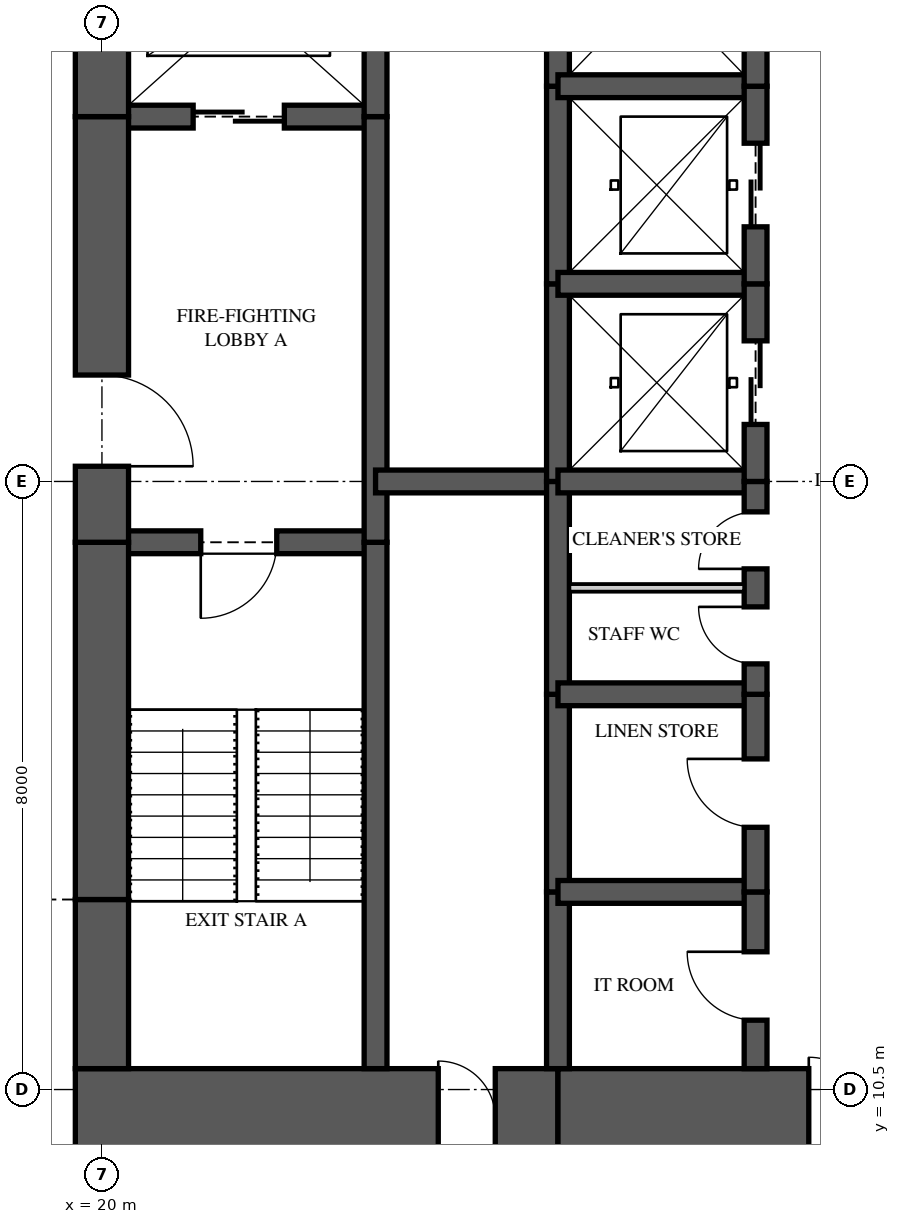
"""IFC4 building model, lengths in metres.
Left out: names, types, materials, properties, quantities, classifications, styles, units other than length and angle.
Written with IfcOpenShell. Run it as: python <this file> out.ifc"""

import sys

from ifc_helpers import new_model, si_unit, direction, frame, frame_2d, origin, place, context, subcontext, project, spatial, rectangle, extrude, element, fill, save


model = new_model("IFC4")
c1 = context("Model", 3, precision=1e-05, world=origin(), true_north=direction((0.0, 1.0)))
c2 = subcontext(c1, "Body", "Model", "MODEL_VIEW")
j1 = project(units=[si_unit("LENGTHUNIT", "METRE"), si_unit("PLANEANGLEUNIT", "RADIAN")], contexts=[c1])
p1 = place(None, origin())
s1 = spatial("IfcSite", under=j1, at=p1, CompositionType="ELEMENT")
p2 = place(p1, origin())
s2 = spatial("IfcBuilding", under=s1, at=p2, CompositionType="ELEMENT")
p3 = place(p2, frame((0.0, 0.0, 187.85)))
s3 = spatial("IfcBuildingStorey", under=s2, at=p3, CompositionType="ELEMENT", Elevation=187.85)
p4 = place(p3, frame((19.65, 10.125, 0.0), z_axis=(0.0, 0.0, 1.0), x_axis=(1.0, 0.0, 0.0)))
e1 = element("IfcWall", 1, at=p4, inside=s3, PredefinedType="SHEAR", context=c2, shape_type="SweptSolid", body=[
    extrude(rectangle(XDim=6.35, YDim=1.3, at=frame_2d((3.175, 0.0))), origin(), (0.0, 0.0, 1.0), 3.35),
])
p5 = place(p4, frame((4.775, 0.0, 0.0)))
e2 = element("IfcOpeningElement", 2, at=p5, cuts=e1, PredefinedType="OPENING", context=c2, shape_type="SweptSolid", body=[
    extrude(rectangle(XDim=0.75, YDim=2.1, at=frame_2d((0.375, 1.05))), frame((0.0, 0.66, 0.0), z_axis=(0.0, -1.0, 0.0), x_axis=(1.0, 0.0, 0.0)), (0.0, 0.0, 1.0), 1.32),
])
p6 = place(p3, frame((26.0, 10.125, 0.0), z_axis=(0.0, 0.0, 1.0), x_axis=(1.0, 0.0, 0.0)))
e3 = element("IfcWall", 3, at=p6, inside=s3, PredefinedType="SHEAR", context=c2, shape_type="SweptSolid", body=[
    extrude(rectangle(XDim=5.6, YDim=1.3, at=frame_2d((2.8, 0.0))), origin(), (0.0, 0.0, 1.0), 3.35),
])
p7 = place(p6, frame((3.3, 0.0, 0.0)))
e4 = element("IfcOpeningElement", 4, at=p7, cuts=e3, PredefinedType="OPENING", context=c2, shape_type="SweptSolid", body=[
    extrude(rectangle(XDim=1.6, YDim=2.1, at=frame_2d((0.8, 1.05))), frame((0.0, 0.66, 0.0), z_axis=(0.0, -1.0, 0.0), x_axis=(1.0, 0.0, 0.0)), (0.0, 0.0, 1.0), 1.32),
])
p8 = place(p3, frame((20.0, 26.225, 0.0), z_axis=(0.0, 0.0, 1.0), x_axis=(0.0, -1.0, 0.0)))
e5 = element("IfcWall", 5, at=p8, inside=s3, PredefinedType="SHEAR", context=c2, shape_type="SweptSolid", body=[
    extrude(rectangle(XDim=2.925, YDim=0.7, at=frame_2d((1.462, 0.0))), origin(), (0.0, 0.0, 1.0), 3.35),
])
p9 = place(p3, frame((20.0, 23.3, 0.0), z_axis=(0.0, 0.0, 1.0), x_axis=(0.0, -1.0, 0.0)))
e6 = element("IfcWall", 6, at=p9, inside=s3, PredefinedType="SHEAR", context=c2, shape_type="SweptSolid", body=[
    extrude(rectangle(XDim=5.6, YDim=0.7, at=frame_2d((2.8, 0.0))), origin(), (0.0, 0.0, 1.0), 3.35),
])
p10 = place(p9, frame((3.4, 0.0, 0.0)))
e7 = element("IfcOpeningElement", 7, at=p10, cuts=e6, PredefinedType="OPENING", context=c2, shape_type="SweptSolid", body=[
    extrude(rectangle(XDim=1.2, YDim=2.2, at=frame_2d((0.6, 1.1))), frame((0.0, 0.36, 0.0), z_axis=(0.0, -1.0, 0.0), x_axis=(1.0, 0.0, 0.0)), (0.0, 0.0, 1.0), 0.72),
])
p11 = place(p3, frame((20.0, 17.7, 0.0), z_axis=(0.0, 0.0, 1.0), x_axis=(0.0, -1.0, 0.0)))
e8 = element("IfcWall", 8, at=p11, inside=s3, PredefinedType="SHEAR", context=c2, shape_type="SweptSolid", body=[
    extrude(rectangle(XDim=4.7, YDim=0.7, at=frame_2d((2.35, 0.0))), origin(), (0.0, 0.0, 1.0), 3.35),
])
p12 = place(p3, frame((20.0, 13.0, 0.0), z_axis=(0.0, 0.0, 1.0), x_axis=(0.0, -1.0, 0.0)))
e9 = element("IfcWall", 9, at=p12, inside=s3, PredefinedType="SHEAR", context=c2, shape_type="SweptSolid", body=[
    extrude(rectangle(XDim=2.225, YDim=0.7, at=frame_2d((1.113, 0.0))), origin(), (0.0, 0.0, 1.0), 3.35),
])
p13 = place(p3, frame((23.6, 10.775, 0.0), z_axis=(0.0, 0.0, 1.0), x_axis=(0.0, 1.0, 0.0)))
e10 = element("IfcWall", 10, at=p13, inside=s3, PredefinedType="SHEAR", context=c2, shape_type="SweptSolid", body=[
    extrude(rectangle(XDim=6.925, YDim=0.3, at=frame_2d((3.462, 0.0))), origin(), (0.0, 0.0, 1.0), 3.35),
])
p14 = place(p3, frame((23.6, 17.7, 0.0), z_axis=(0.0, 0.0, 1.0), x_axis=(0.0, 1.0, 0.0)))
e11 = element("IfcWall", 11, at=p14, inside=s3, PredefinedType="SHEAR", context=c2, shape_type="SweptSolid", body=[
    extrude(rectangle(XDim=5.6, YDim=0.3, at=frame_2d((2.8, 0.0))), origin(), (0.0, 0.0, 1.0), 3.35),
])
p15 = place(p3, frame((23.6, 23.3, 0.0), z_axis=(0.0, 0.0, 1.0), x_axis=(0.0, 1.0, 0.0)))
e12 = element("IfcWall", 12, at=p15, inside=s3, PredefinedType="SHEAR", context=c2, shape_type="SweptSolid", body=[
    extrude(rectangle(XDim=2.925, YDim=0.3, at=frame_2d((1.462, 0.0))), origin(), (0.0, 0.0, 1.0), 3.35),
])
p16 = place(p3, frame((26.0, 10.775, 0.0), z_axis=(0.0, 0.0, 1.0), x_axis=(0.0, 1.0, 0.0)))
e13 = element("IfcWall", 13, at=p16, inside=s3, PredefinedType="SHEAR", context=c2, shape_type="SweptSolid", body=[
    extrude(rectangle(XDim=2.325, YDim=0.3, at=frame_2d((1.163, 0.0))), origin(), (0.0, 0.0, 1.0), 3.35),
])
p17 = place(p3, frame((26.0, 13.1, 0.0), z_axis=(0.0, 0.0, 1.0), x_axis=(0.0, 1.0, 0.0)))
e14 = element("IfcWall", 14, at=p17, inside=s3, PredefinedType="SHEAR", context=c2, shape_type="SweptSolid", body=[
    extrude(rectangle(XDim=2.6, YDim=0.3, at=frame_2d((1.3, 0.0))), origin(), (0.0, 0.0, 1.0), 3.35),
])
p18 = place(p3, frame((26.0, 15.7, 0.0), z_axis=(0.0, 0.0, 1.0), x_axis=(0.0, 1.0, 0.0)))
e15 = element("IfcWall", 15, at=p18, inside=s3, PredefinedType="SHEAR", context=c2, shape_type="SweptSolid", body=[
    extrude(rectangle(XDim=2.8, YDim=0.3, at=frame_2d((1.4, 0.0))), origin(), (0.0, 0.0, 1.0), 3.35),
])
p19 = place(p3, frame((26.0, 18.5, 0.0), z_axis=(0.0, 0.0, 1.0), x_axis=(0.0, 1.0, 0.0)))
e16 = element("IfcWall", 16, at=p19, inside=s3, PredefinedType="SHEAR", context=c2, shape_type="SweptSolid", body=[
    extrude(rectangle(XDim=2.6, YDim=0.3, at=frame_2d((1.3, 0.0))), origin(), (0.0, 0.0, 1.0), 3.35),
])
p20 = place(p3, frame((26.0, 21.1, 0.0), z_axis=(0.0, 0.0, 1.0), x_axis=(0.0, 1.0, 0.0)))
e17 = element("IfcWall", 17, at=p20, inside=s3, PredefinedType="SHEAR", context=c2, shape_type="SweptSolid", body=[
    extrude(rectangle(XDim=2.6, YDim=0.3, at=frame_2d((1.3, 0.0))), origin(), (0.0, 0.0, 1.0), 3.35),
])
p21 = place(p3, frame((26.0, 23.7, 0.0), z_axis=(0.0, 0.0, 1.0), x_axis=(0.0, 1.0, 0.0)))
e18 = element("IfcWall", 18, at=p21, inside=s3, PredefinedType="SHEAR", context=c2, shape_type="SweptSolid", body=[
    extrude(rectangle(XDim=2.525, YDim=0.3, at=frame_2d((1.263, 0.0))), origin(), (0.0, 0.0, 1.0), 3.35),
])
p22 = place(p3, frame((28.6, 10.775, 0.0), z_axis=(0.0, 0.0, 1.0), x_axis=(0.0, 1.0, 0.0)))
e19 = element("IfcWall", 19, at=p22, inside=s3, PredefinedType="SHEAR", context=c2, shape_type="SweptSolid", body=[
    extrude(rectangle(XDim=2.325, YDim=0.3, at=frame_2d((1.163, 0.0))), origin(), (0.0, 0.0, 1.0), 3.35),
])
p23 = place(p22, frame((0.637, 0.0, 0.0)))
e20 = element("IfcOpeningElement", 20, at=p23, cuts=e19, PredefinedType="OPENING", context=c2, shape_type="SweptSolid", body=[
    extrude(rectangle(XDim=0.9, YDim=2.1, at=frame_2d((0.45, 1.05))), frame((0.0, 0.16, 0.0), z_axis=(0.0, -1.0, 0.0), x_axis=(1.0, 0.0, 0.0)), (0.0, 0.0, 1.0), 0.32),
])
p24 = place(p3, frame((28.6, 13.1, 0.0), z_axis=(0.0, 0.0, 1.0), x_axis=(0.0, 1.0, 0.0)))
e21 = element("IfcWall", 21, at=p24, inside=s3, PredefinedType="SHEAR", context=c2, shape_type="SweptSolid", body=[
    extrude(rectangle(XDim=2.6, YDim=0.3, at=frame_2d((1.3, 0.0))), origin(), (0.0, 0.0, 1.0), 3.35),
])
p25 = place(p24, frame((0.85, 0.0, 0.0)))
e22 = element("IfcOpeningElement", 22, at=p25, cuts=e21, PredefinedType="OPENING", context=c2, shape_type="SweptSolid", body=[
    extrude(rectangle(XDim=0.9, YDim=2.1, at=frame_2d((0.45, 1.05))), frame((0.0, 0.16, 0.0), z_axis=(0.0, -1.0, 0.0), x_axis=(1.0, 0.0, 0.0)), (0.0, 0.0, 1.0), 0.32),
])
p26 = place(p3, frame((28.6, 15.7, 0.0), z_axis=(0.0, 0.0, 1.0), x_axis=(0.0, 1.0, 0.0)))
e23 = element("IfcWall", 23, at=p26, inside=s3, PredefinedType="SHEAR", context=c2, shape_type="SweptSolid", body=[
    extrude(rectangle(XDim=2.8, YDim=0.3, at=frame_2d((1.4, 0.0))), origin(), (0.0, 0.0, 1.0), 3.35),
])
p27 = place(p26, frame((0.4, 0.0, 0.0)))
e24 = element("IfcOpeningElement", 24, at=p27, cuts=e23, PredefinedType="OPENING", context=c2, shape_type="SweptSolid", body=[
    extrude(rectangle(XDim=0.75, YDim=2.1, at=frame_2d((0.375, 1.05))), frame((0.0, 0.16, 0.0), z_axis=(0.0, -1.0, 0.0), x_axis=(1.0, 0.0, 0.0)), (0.0, 0.0, 1.0), 0.32),
])
p28 = place(p26, frame((1.65, 0.0, 0.0)))
e25 = element("IfcOpeningElement", 25, at=p28, cuts=e23, PredefinedType="OPENING", context=c2, shape_type="SweptSolid", body=[
    extrude(rectangle(XDim=0.75, YDim=2.1, at=frame_2d((0.375, 1.05))), frame((0.0, 0.16, 0.0), z_axis=(0.0, -1.0, 0.0), x_axis=(1.0, 0.0, 0.0)), (0.0, 0.0, 1.0), 0.32),
])
p29 = place(p3, frame((28.6, 18.5, 0.0), z_axis=(0.0, 0.0, 1.0), x_axis=(0.0, 1.0, 0.0)))
e26 = element("IfcWall", 26, at=p29, inside=s3, PredefinedType="SHEAR", context=c2, shape_type="SweptSolid", body=[
    extrude(rectangle(XDim=2.6, YDim=0.3, at=frame_2d((1.3, 0.0))), origin(), (0.0, 0.0, 1.0), 3.35),
])
p30 = place(p29, frame((0.75, 0.0, 0.0)))
e27 = element("IfcOpeningElement", 27, at=p30, cuts=e26, PredefinedType="OPENING", context=c2, shape_type="SweptSolid", body=[
    extrude(rectangle(XDim=1.1, YDim=2.1, at=frame_2d((0.55, 1.05))), frame((0.0, 0.16, 0.0), z_axis=(0.0, -1.0, 0.0), x_axis=(1.0, 0.0, 0.0)), (0.0, 0.0, 1.0), 0.32),
])
p31 = place(p3, frame((28.6, 21.1, 0.0), z_axis=(0.0, 0.0, 1.0), x_axis=(0.0, 1.0, 0.0)))
e28 = element("IfcWall", 28, at=p31, inside=s3, PredefinedType="SHEAR", context=c2, shape_type="SweptSolid", body=[
    extrude(rectangle(XDim=2.6, YDim=0.3, at=frame_2d((1.3, 0.0))), origin(), (0.0, 0.0, 1.0), 3.35),
])
p32 = place(p31, frame((0.75, 0.0, 0.0)))
e29 = element("IfcOpeningElement", 29, at=p32, cuts=e28, PredefinedType="OPENING", context=c2, shape_type="SweptSolid", body=[
    extrude(rectangle(XDim=1.1, YDim=2.1, at=frame_2d((0.55, 1.05))), frame((0.0, 0.16, 0.0), z_axis=(0.0, -1.0, 0.0), x_axis=(1.0, 0.0, 0.0)), (0.0, 0.0, 1.0), 0.32),
])
p33 = place(p3, frame((28.6, 23.7, 0.0), z_axis=(0.0, 0.0, 1.0), x_axis=(0.0, 1.0, 0.0)))
e30 = element("IfcWall", 30, at=p33, inside=s3, PredefinedType="SHEAR", context=c2, shape_type="SweptSolid", body=[
    extrude(rectangle(XDim=2.525, YDim=0.3, at=frame_2d((1.263, 0.0))), origin(), (0.0, 0.0, 1.0), 3.35),
])
p34 = place(p33, frame((0.85, 0.0, 0.0)))
e31 = element("IfcOpeningElement", 31, at=p34, cuts=e30, PredefinedType="OPENING", context=c2, shape_type="SweptSolid", body=[
    extrude(rectangle(XDim=1.1, YDim=2.1, at=frame_2d((0.55, 1.05))), frame((0.0, 0.16, 0.0), z_axis=(0.0, -1.0, 0.0), x_axis=(1.0, 0.0, 0.0)), (0.0, 0.0, 1.0), 0.32),
])
p35 = place(p3, frame((20.0, 17.7, 0.0), z_axis=(0.0, 0.0, 1.0), x_axis=(1.0, 0.0, 0.0)))
e32 = element("IfcWall", 32, at=p35, inside=s3, PredefinedType="SHEAR", context=c2, shape_type="SweptSolid", body=[
    extrude(rectangle(XDim=3.6, YDim=0.3, at=frame_2d((1.8, 0.0))), origin(), (0.0, 0.0, 1.0), 3.35),
])
p36 = place(p35, frame((1.3, 0.0, 0.0)))
e33 = element("IfcOpeningElement", 33, at=p36, cuts=e32, PredefinedType="OPENING", context=c2, shape_type="SweptSolid", body=[
    extrude(rectangle(XDim=1.0, YDim=2.1, at=frame_2d((0.5, 1.05))), frame((0.0, 0.16, 0.0), z_axis=(0.0, -1.0, 0.0), x_axis=(1.0, 0.0, 0.0)), (0.0, 0.0, 1.0), 0.32),
])
p37 = place(p3, frame((20.0, 23.3, 0.0), z_axis=(0.0, 0.0, 1.0), x_axis=(1.0, 0.0, 0.0)))
e34 = element("IfcWall", 34, at=p37, inside=s3, PredefinedType="SHEAR", context=c2, shape_type="SweptSolid", body=[
    extrude(rectangle(XDim=3.6, YDim=0.3, at=frame_2d((1.8, 0.0))), origin(), (0.0, 0.0, 1.0), 3.35),
])
p38 = place(p37, frame((1.2, 0.0, 0.0)))
e35 = element("IfcOpeningElement", 35, at=p38, cuts=e34, PredefinedType="OPENING", context=c2, shape_type="SweptSolid", body=[
    extrude(rectangle(XDim=1.2, YDim=2.1, at=frame_2d((0.6, 1.05))), frame((0.0, 0.16, 0.0), z_axis=(0.0, -1.0, 0.0), x_axis=(1.0, 0.0, 0.0)), (0.0, 0.0, 1.0), 0.32),
])
p39 = place(p3, frame((23.6, 18.5, 0.0), z_axis=(0.0, 0.0, 1.0), x_axis=(1.0, 0.0, 0.0)))
e36 = element("IfcWall", 36, at=p39, inside=s3, PredefinedType="SHEAR", context=c2, shape_type="SweptSolid", body=[
    extrude(rectangle(XDim=2.4, YDim=0.3, at=frame_2d((1.2, 0.0))), origin(), (0.0, 0.0, 1.0), 3.35),
])
for number, where, z_axis, x_axis in (
    (37, (26.0, 13.1, 0.0), (0.0, 0.0, 1.0), (1.0, 0.0, 0.0)),
    (38, (26.0, 15.7, 0.0), (0.0, 0.0, 1.0), (1.0, 0.0, 0.0)),
    (39, (26.0, 18.5, 0.0), (0.0, 0.0, 1.0), (1.0, 0.0, 0.0)),
    (40, (26.0, 21.1, 0.0), (0.0, 0.0, 1.0), (1.0, 0.0, 0.0)),
    (41, (26.0, 23.7, 0.0), (0.0, 0.0, 1.0), (1.0, 0.0, 0.0)),
):
    element("IfcWall", number, at=place(p3, frame(where, z_axis=z_axis, x_axis=x_axis)), inside=s3, PredefinedType="SHEAR", context=c2, shape_type="SweptSolid", body=[
        extrude(rectangle(XDim=2.6, YDim=0.3, at=frame_2d((1.3, 0.0))), origin(), (0.0, 0.0, 1.0), 3.35),
    ])
p40 = place(p3, frame((26.15, 17.1, 0.0), z_axis=(0.0, 0.0, 1.0), x_axis=(1.0, 0.0, 0.0)))
e42 = element("IfcWall", 42, at=p40, inside=s3, PredefinedType="PARTITIONING", context=c2, shape_type="SweptSolid", body=[
    extrude(rectangle(XDim=2.3, YDim=0.1, at=frame_2d((1.15, 0.0))), origin(), (0.0, 0.0, 1.0), 3.11),
])
p41 = place(p36, frame((1.0, 0.0, 0.0), z_axis=(0.0, 0.0, 1.0), x_axis=(-1.0, 0.0, 0.0)))
e43 = element("IfcDoor", 43, at=p41, inside=s3, OperationType="SINGLE_SWING_RIGHT", PredefinedType="DOOR", context=c2, shape_type="SweptSolid", body=[
    extrude(rectangle(XDim=1.0, YDim=2.1, at=frame_2d((0.5, 1.05))), frame((0.0, 0.025, 0.0), z_axis=(0.0, -1.0, 0.0), x_axis=(1.0, 0.0, 0.0)), (0.0, 0.0, 1.0), 0.05),
])
fill(e33, e43)
p42 = place(p10, origin())
e44 = element("IfcDoor", 44, at=p42, inside=s3, OperationType="SINGLE_SWING_RIGHT", PredefinedType="DOOR", context=c2, shape_type="SweptSolid", body=[
    extrude(rectangle(XDim=1.2, YDim=2.2, at=frame_2d((0.6, 1.1))), frame((0.0, 0.025, 0.0), z_axis=(0.0, -1.0, 0.0), x_axis=(1.0, 0.0, 0.0)), (0.0, 0.0, 1.0), 0.05),
])
fill(e7, e44)
p43 = place(p38, origin())
e45 = element("IfcDoor", 45, at=p43, inside=s3, OperationType="SLIDING_TO_LEFT", PredefinedType="DOOR", context=c2, shape_type="SweptSolid", body=[
    extrude(rectangle(XDim=1.2, YDim=2.1, at=frame_2d((0.6, 1.05))), frame((0.0, 0.025, 0.0), z_axis=(0.0, -1.0, 0.0), x_axis=(1.0, 0.0, 0.0)), (0.0, 0.0, 1.0), 0.05),
])
fill(e35, e45)
p44 = place(p30, origin())
e46 = element("IfcDoor", 46, at=p44, inside=s3, OperationType="SLIDING_TO_LEFT", PredefinedType="DOOR", context=c2, shape_type="SweptSolid", body=[
    extrude(rectangle(XDim=1.1, YDim=2.1, at=frame_2d((0.55, 1.05))), frame((0.0, 0.025, 0.0), z_axis=(0.0, -1.0, 0.0), x_axis=(1.0, 0.0, 0.0)), (0.0, 0.0, 1.0), 0.05),
])
fill(e27, e46)
p45 = place(p32, origin())
e47 = element("IfcDoor", 47, at=p45, inside=s3, OperationType="SLIDING_TO_LEFT", PredefinedType="DOOR", context=c2, shape_type="SweptSolid", body=[
    extrude(rectangle(XDim=1.1, YDim=2.1, at=frame_2d((0.55, 1.05))), frame((0.0, 0.025, 0.0), z_axis=(0.0, -1.0, 0.0), x_axis=(1.0, 0.0, 0.0)), (0.0, 0.0, 1.0), 0.05),
])
fill(e29, e47)
p46 = place(p23, origin())
e48 = element("IfcDoor", 48, at=p46, inside=s3, OperationType="SINGLE_SWING_RIGHT", PredefinedType="DOOR", context=c2, shape_type="SweptSolid", body=[
    extrude(rectangle(XDim=0.9, YDim=2.1, at=frame_2d((0.45, 1.05))), frame((0.0, 0.025, 0.0), z_axis=(0.0, -1.0, 0.0), x_axis=(1.0, 0.0, 0.0)), (0.0, 0.0, 1.0), 0.05),
])
fill(e20, e48)
p47 = place(p25, origin())
e49 = element("IfcDoor", 49, at=p47, inside=s3, OperationType="SINGLE_SWING_RIGHT", PredefinedType="DOOR", context=c2, shape_type="SweptSolid", body=[
    extrude(rectangle(XDim=0.9, YDim=2.1, at=frame_2d((0.45, 1.05))), frame((0.0, 0.025, 0.0), z_axis=(0.0, -1.0, 0.0), x_axis=(1.0, 0.0, 0.0)), (0.0, 0.0, 1.0), 0.05),
])
fill(e22, e49)
p48 = place(p27, origin())
e50 = element("IfcDoor", 50, at=p48, inside=s3, OperationType="SINGLE_SWING_RIGHT", PredefinedType="DOOR", context=c2, shape_type="SweptSolid", body=[
    extrude(rectangle(XDim=0.75, YDim=2.1, at=frame_2d((0.375, 1.05))), frame((0.0, 0.025, 0.0), z_axis=(0.0, -1.0, 0.0), x_axis=(1.0, 0.0, 0.0)), (0.0, 0.0, 1.0), 0.05),
])
fill(e24, e50)
p49 = place(p28, origin())
e51 = element("IfcDoor", 51, at=p49, inside=s3, OperationType="SINGLE_SWING_LEFT", PredefinedType="DOOR", context=c2, shape_type="SweptSolid", body=[
    extrude(rectangle(XDim=0.75, YDim=2.1, at=frame_2d((0.375, 1.05))), frame((0.0, 0.025, 0.0), z_axis=(0.0, -1.0, 0.0), x_axis=(1.0, 0.0, 0.0)), (0.0, 0.0, 1.0), 0.05),
])
fill(e25, e51)
p50 = place(p7, origin())
e52 = element("IfcDoor", 52, at=p50, inside=s3, OperationType="DOUBLE_DOOR_SINGLE_SWING", PredefinedType="DOOR", context=c2, shape_type="SweptSolid", body=[
    extrude(rectangle(XDim=1.6, YDim=2.1, at=frame_2d((0.8, 1.05))), frame((0.0, 0.025, 0.0), z_axis=(0.0, -1.0, 0.0), x_axis=(1.0, 0.0, 0.0)), (0.0, 0.0, 1.0), 0.05),
])
fill(e4, e52)
p51 = place(p5, origin())
e53 = element("IfcDoor", 53, at=p51, inside=s3, OperationType="SINGLE_SWING_LEFT", PredefinedType="DOOR", context=c2, shape_type="SweptSolid", body=[
    extrude(rectangle(XDim=0.75, YDim=2.1, at=frame_2d((0.375, 1.05))), frame((0.0, 0.025, 0.0), z_axis=(0.0, -1.0, 0.0), x_axis=(1.0, 0.0, 0.0)), (0.0, 0.0, 1.0), 0.05),
])
fill(e2, e53)
save(model, sys.argv[1])
